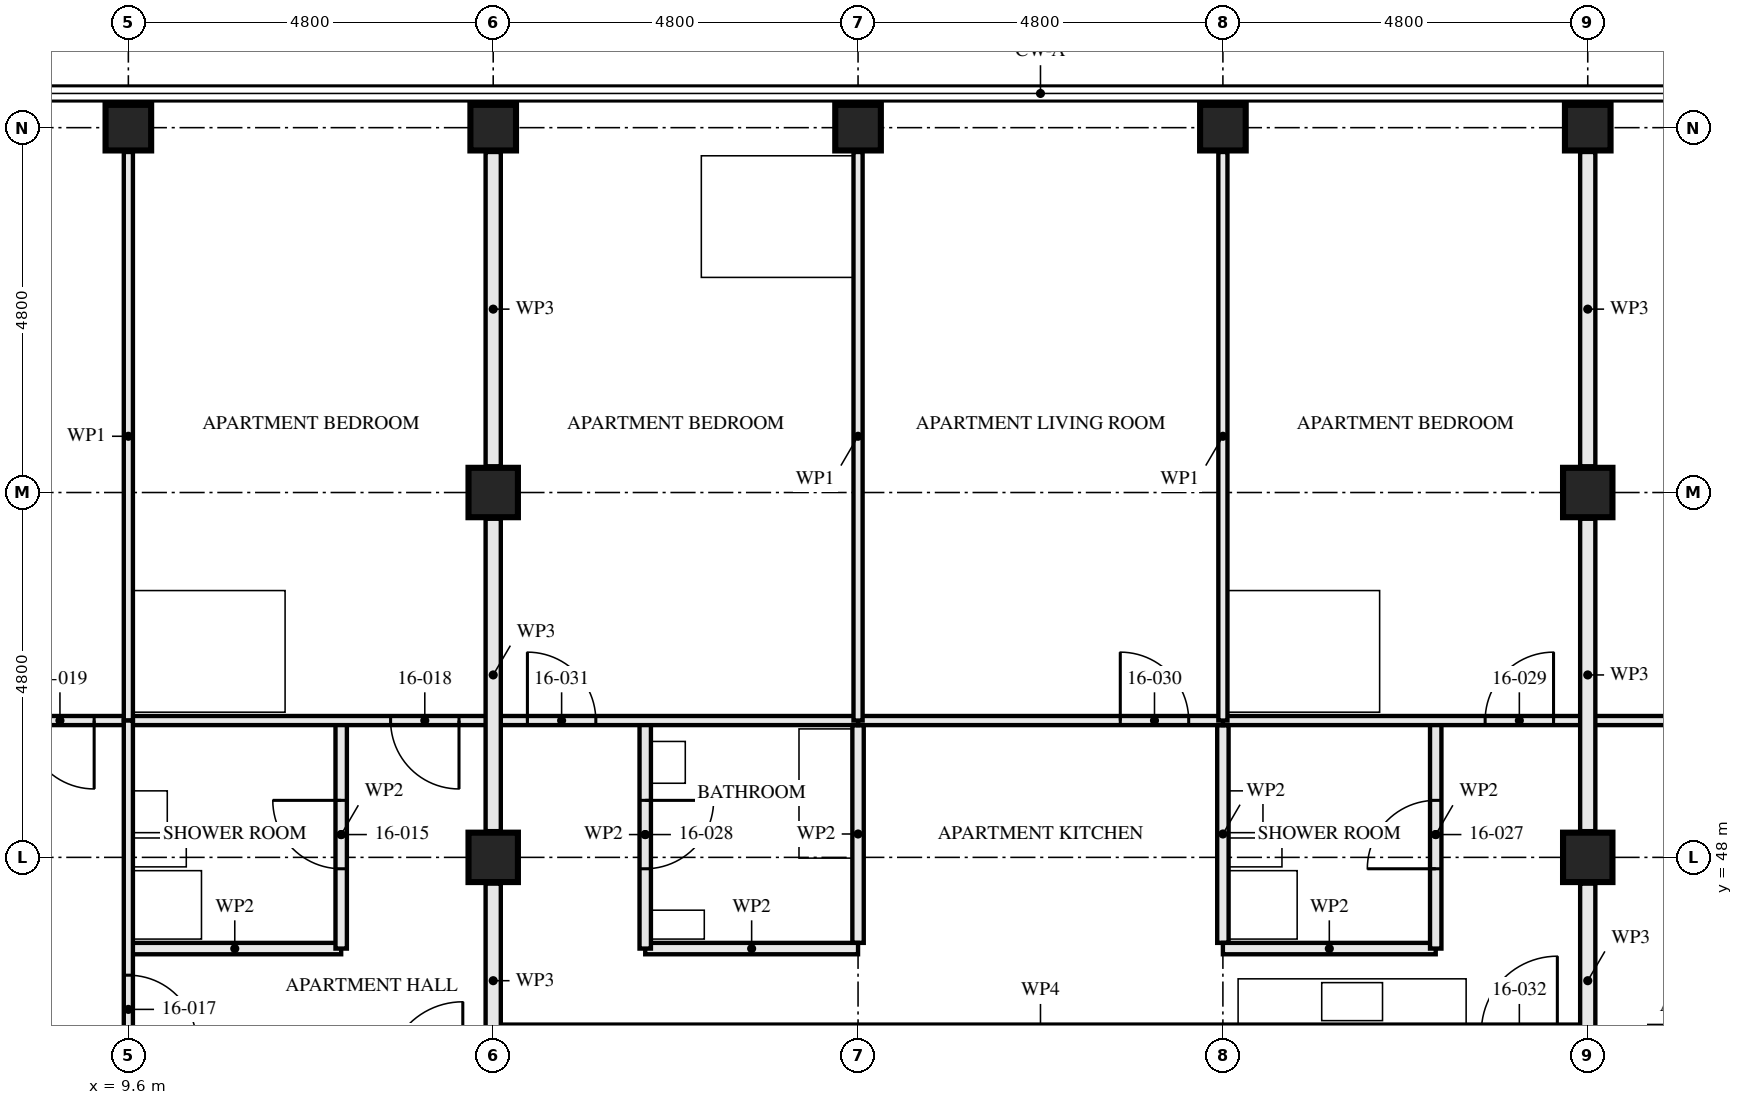
"""IFC4 building model, lengths in metres.
Left out: names, types, materials, properties, quantities, classifications, styles, units other than length and angle.
Written with IfcOpenShell. Run it as: python <this file> out.ifc"""

import sys

from ifc_helpers import new_model, si_unit, direction, frame, frame_2d, origin, origin_2d, place, context, subcontext, project, spatial, rectangle, hollow_rectangle, extrude, element, fill, save


model = new_model("IFC4")
c1 = context("Model", 3, precision=1e-05, world=origin(), true_north=direction((0.0, 1.0)))
c2 = subcontext(c1, "Body", "Model", "MODEL_VIEW")
j1 = project(units=[si_unit("LENGTHUNIT", "METRE"), si_unit("PLANEANGLEUNIT", "RADIAN")], contexts=[c1])
p1 = place(None, origin())
s1 = spatial("IfcSite", under=j1, at=p1, CompositionType="ELEMENT")
p2 = place(p1, origin())
s2 = spatial("IfcBuilding", under=s1, at=p2, CompositionType="ELEMENT")
p3 = place(p2, frame((0.0, 0.0, 62.0)))
s3 = spatial("IfcBuildingStorey", under=s2, at=p3, CompositionType="ELEMENT", Elevation=62.0)
p4 = place(p3, frame((9.6, 57.6, 0.0), z_axis=(0.0, 0.0, 1.0), x_axis=(0.0, 1.0, 0.0)))
e1 = element("IfcColumn", 1, at=p4, inside=s3, PredefinedType="COLUMN", context=c2, shape_type="SweptSolid", body=[
    extrude(hollow_rectangle(XDim=0.6, YDim=0.6, WallThickness=0.08, at=origin_2d()), origin(), (0.0, 0.0, 1.0), 3.5),
])
for number, where, z_axis, x_axis in (
    (2, (14.4, 48.0, 0.0), (0.0, 0.0, 1.0), (1.0, 0.0, 0.0)),
    (3, (14.4, 52.8, 0.0), (0.0, 0.0, 1.0), (1.0, 0.0, 0.0)),
):
    element("IfcColumn", number, at=place(p3, frame(where, z_axis=z_axis, x_axis=x_axis)), inside=s3, PredefinedType="COLUMN", context=c2, shape_type="SweptSolid", body=[
        extrude(hollow_rectangle(XDim=0.65, YDim=0.65, WallThickness=0.05, at=origin_2d()), origin(), (0.0, 0.0, 1.0), 3.5),
    ])
for number, where, z_axis, x_axis in (
    (4, (14.4, 57.6, 0.0), (0.0, 0.0, 1.0), (0.0, 1.0, 0.0)),
    (5, (19.2, 57.6, 0.0), (0.0, 0.0, 1.0), (0.0, 1.0, 0.0)),
    (6, (24.0, 57.6, 0.0), (0.0, 0.0, 1.0), (0.0, 1.0, 0.0)),
):
    element("IfcColumn", number, at=place(p3, frame(where, z_axis=z_axis, x_axis=x_axis)), inside=s3, PredefinedType="COLUMN", context=c2, shape_type="SweptSolid", body=[
        extrude(hollow_rectangle(XDim=0.6, YDim=0.6, WallThickness=0.08, at=origin_2d()), origin(), (0.0, 0.0, 1.0), 3.5),
    ])
for number, where, z_axis, x_axis in (
    (7, (28.8, 48.0, 0.0), (0.0, 0.0, 1.0), (1.0, 0.0, 0.0)),
    (8, (28.8, 52.8, 0.0), (0.0, 0.0, 1.0), (1.0, 0.0, 0.0)),
):
    element("IfcColumn", number, at=place(p3, frame(where, z_axis=z_axis, x_axis=x_axis)), inside=s3, PredefinedType="COLUMN", context=c2, shape_type="SweptSolid", body=[
        extrude(hollow_rectangle(XDim=0.65, YDim=0.65, WallThickness=0.05, at=origin_2d()), origin(), (0.0, 0.0, 1.0), 3.5),
    ])
p5 = place(p3, frame((28.8, 57.6, 0.0), z_axis=(0.0, 0.0, 1.0), x_axis=(0.0, 1.0, 0.0)))
e9 = element("IfcColumn", 9, at=p5, inside=s3, PredefinedType="COLUMN", context=c2, shape_type="SweptSolid", body=[
    extrude(hollow_rectangle(XDim=0.6, YDim=0.6, WallThickness=0.08, at=origin_2d()), origin(), (0.0, 0.0, 1.0), 3.5),
])
p6 = place(p3, frame((12.4, 49.8, 0.0), z_axis=(0.0, 0.0, 1.0), x_axis=(0.0, -1.0, 0.0)))
e10 = element("IfcWall", 10, at=p6, inside=s3, PredefinedType="PARTITIONING", context=c2, shape_type="SweptSolid", body=[
    extrude(rectangle(XDim=3.0, YDim=0.15, at=frame_2d((1.5, 0.0))), origin(), (0.0, 0.0, 1.0), 2.55),
])
p7 = place(p6, frame((1.05, 0.0, 0.0)))
e11 = element("IfcOpeningElement", 11, at=p7, cuts=e10, PredefinedType="OPENING", context=c2, shape_type="SweptSolid", body=[
    extrude(rectangle(XDim=0.9, YDim=2.1, at=frame_2d((0.45, 1.05))), frame((0.0, 0.085, 0.0), z_axis=(0.0, -1.0, 0.0), x_axis=(1.0, 0.0, 0.0)), (0.0, 0.0, 1.0), 0.171),
])
p8 = place(p3, frame((12.4, 46.8, 0.0), z_axis=(0.0, 0.0, 1.0), x_axis=(-1.0, 0.0, 0.0)))
e12 = element("IfcWall", 12, at=p8, inside=s3, PredefinedType="PARTITIONING", context=c2, shape_type="SweptSolid", body=[
    extrude(rectangle(XDim=2.8, YDim=0.15, at=frame_2d((1.4, 0.0))), origin(), (0.0, 0.0, 1.0), 3.33),
])
p9 = place(p3, frame((9.6, 49.8, 0.0), z_axis=(0.0, 0.0, 1.0), x_axis=(0.0, -1.0, 0.0)))
e13 = element("IfcWall", 13, at=p9, inside=s3, PredefinedType="PARTITIONING", context=c2, shape_type="SweptSolid", body=[
    extrude(rectangle(XDim=4.65, YDim=0.12, at=frame_2d((2.325, 0.0))), origin(), (0.0, 0.0, 1.0), 2.55),
])
p10 = place(p9, frame((3.35, 0.0, 0.0)))
e14 = element("IfcOpeningElement", 14, at=p10, cuts=e13, PredefinedType="OPENING", context=c2, shape_type="SweptSolid", body=[
    extrude(rectangle(XDim=0.9, YDim=2.1, at=frame_2d((0.45, 1.05))), frame((0.0, 0.071, 0.0), z_axis=(0.0, -1.0, 0.0), x_axis=(1.0, 0.0, 0.0)), (0.0, 0.0, 1.0), 0.141),
])
p11 = place(p3, frame((14.4, 49.8, 0.0), z_axis=(0.0, 0.0, 1.0), x_axis=(-1.0, 0.0, 0.0)))
e15 = element("IfcWall", 15, at=p11, inside=s3, PredefinedType="PARTITIONING", context=c2, shape_type="SweptSolid", body=[
    extrude(rectangle(XDim=4.8, YDim=0.12, at=frame_2d((2.4, 0.0))), origin(), (0.0, 0.0, 1.0), 3.33),
])
p12 = place(p11, frame((0.45, 0.0, 0.0)))
e16 = element("IfcOpeningElement", 16, at=p12, cuts=e15, PredefinedType="OPENING", context=c2, shape_type="SweptSolid", body=[
    extrude(rectangle(XDim=0.9, YDim=2.1, at=frame_2d((0.45, 1.05))), frame((0.0, 0.071, 0.0), z_axis=(0.0, -1.0, 0.0), x_axis=(1.0, 0.0, 0.0)), (0.0, 0.0, 1.0), 0.141),
])
p13 = place(p3, frame((9.6, 49.8, 0.0), z_axis=(0.0, 0.0, 1.0), x_axis=(-1.0, 0.0, 0.0)))
e17 = element("IfcWall", 17, at=p13, inside=s3, PredefinedType="PARTITIONING", context=c2, shape_type="SweptSolid", body=[
    extrude(rectangle(XDim=4.8, YDim=0.12, at=frame_2d((2.4, 0.0))), origin(), (0.0, 0.0, 1.0), 3.33),
])
p14 = place(p13, frame((0.45, 0.0, 0.0)))
e18 = element("IfcOpeningElement", 18, at=p14, cuts=e17, PredefinedType="OPENING", context=c2, shape_type="SweptSolid", body=[
    extrude(rectangle(XDim=0.9, YDim=2.1, at=frame_2d((0.45, 1.05))), frame((0.0, 0.071, 0.0), z_axis=(0.0, -1.0, 0.0), x_axis=(1.0, 0.0, 0.0)), (0.0, 0.0, 1.0), 0.141),
])
p15 = place(p3, frame((9.6, 57.28, 0.0), z_axis=(0.0, 0.0, 1.0), x_axis=(0.0, -1.0, 0.0)))
e19 = element("IfcWall", 19, at=p15, inside=s3, PredefinedType="PARTITIONING", context=c2, shape_type="SweptSolid", body=[
    extrude(rectangle(XDim=7.48, YDim=0.12, at=frame_2d((3.74, 0.0))), origin(), (0.0, 0.0, 1.0), 2.55),
])
p16 = place(p3, frame((26.8, 49.8, 0.0), z_axis=(0.0, 0.0, 1.0), x_axis=(0.0, -1.0, 0.0)))
e20 = element("IfcWall", 20, at=p16, inside=s3, PredefinedType="PARTITIONING", context=c2, shape_type="SweptSolid", body=[
    extrude(rectangle(XDim=3.0, YDim=0.15, at=frame_2d((1.5, 0.0))), origin(), (0.0, 0.0, 1.0), 2.55),
])
p17 = place(p16, frame((1.05, 0.0, 0.0)))
e21 = element("IfcOpeningElement", 21, at=p17, cuts=e20, PredefinedType="OPENING", context=c2, shape_type="SweptSolid", body=[
    extrude(rectangle(XDim=0.9, YDim=2.1, at=frame_2d((0.45, 1.05))), frame((0.0, 0.085, 0.0), z_axis=(0.0, -1.0, 0.0), x_axis=(1.0, 0.0, 0.0)), (0.0, 0.0, 1.0), 0.171),
])
p18 = place(p3, frame((26.8, 46.8, 0.0), z_axis=(0.0, 0.0, 1.0), x_axis=(-1.0, 0.0, 0.0)))
e22 = element("IfcWall", 22, at=p18, inside=s3, PredefinedType="PARTITIONING", context=c2, shape_type="SweptSolid", body=[
    extrude(rectangle(XDim=2.8, YDim=0.15, at=frame_2d((1.4, 0.0))), origin(), (0.0, 0.0, 1.0), 3.33),
])
p19 = place(p3, frame((16.4, 49.8, 0.0), z_axis=(0.0, 0.0, 1.0), x_axis=(0.0, -1.0, 0.0)))
e23 = element("IfcWall", 23, at=p19, inside=s3, PredefinedType="PARTITIONING", context=c2, shape_type="SweptSolid", body=[
    extrude(rectangle(XDim=3.0, YDim=0.15, at=frame_2d((1.5, 0.0))), origin(), (0.0, 0.0, 1.0), 2.55),
])
p20 = place(p19, frame((1.05, 0.0, 0.0)))
e24 = element("IfcOpeningElement", 24, at=p20, cuts=e23, PredefinedType="OPENING", context=c2, shape_type="SweptSolid", body=[
    extrude(rectangle(XDim=0.9, YDim=2.1, at=frame_2d((0.45, 1.05))), frame((0.0, 0.085, 0.0), z_axis=(0.0, -1.0, 0.0), x_axis=(1.0, 0.0, 0.0)), (0.0, 0.0, 1.0), 0.171),
])
p21 = place(p3, frame((19.2, 46.8, 0.0), z_axis=(0.0, 0.0, 1.0), x_axis=(-1.0, 0.0, 0.0)))
e25 = element("IfcWall", 25, at=p21, inside=s3, PredefinedType="PARTITIONING", context=c2, shape_type="SweptSolid", body=[
    extrude(rectangle(XDim=2.8, YDim=0.15, at=frame_2d((1.4, 0.0))), origin(), (0.0, 0.0, 1.0), 3.33),
])
p22 = place(p3, frame((28.8, 49.8, 0.0), z_axis=(0.0, 0.0, 1.0), x_axis=(-1.0, 0.0, 0.0)))
e26 = element("IfcWall", 26, at=p22, inside=s3, PredefinedType="PARTITIONING", context=c2, shape_type="SweptSolid", body=[
    extrude(rectangle(XDim=4.8, YDim=0.12, at=frame_2d((2.4, 0.0))), origin(), (0.0, 0.0, 1.0), 3.33),
])
p23 = place(p22, frame((0.45, 0.0, 0.0)))
e27 = element("IfcOpeningElement", 27, at=p23, cuts=e26, PredefinedType="OPENING", context=c2, shape_type="SweptSolid", body=[
    extrude(rectangle(XDim=0.9, YDim=2.1, at=frame_2d((0.45, 1.05))), frame((0.0, 0.071, 0.0), z_axis=(0.0, -1.0, 0.0), x_axis=(1.0, 0.0, 0.0)), (0.0, 0.0, 1.0), 0.141),
])
p24 = place(p3, frame((24.0, 49.8, 0.0), z_axis=(0.0, 0.0, 1.0), x_axis=(-1.0, 0.0, 0.0)))
e28 = element("IfcWall", 28, at=p24, inside=s3, PredefinedType="PARTITIONING", context=c2, shape_type="SweptSolid", body=[
    extrude(rectangle(XDim=4.8, YDim=0.12, at=frame_2d((2.4, 0.0))), origin(), (0.0, 0.0, 1.0), 3.33),
])
p25 = place(p24, frame((0.45, 0.0, 0.0)))
e29 = element("IfcOpeningElement", 29, at=p25, cuts=e28, PredefinedType="OPENING", context=c2, shape_type="SweptSolid", body=[
    extrude(rectangle(XDim=0.9, YDim=2.1, at=frame_2d((0.45, 1.05))), frame((0.0, 0.071, 0.0), z_axis=(0.0, -1.0, 0.0), x_axis=(1.0, 0.0, 0.0)), (0.0, 0.0, 1.0), 0.141),
])
p26 = place(p3, frame((19.2, 49.8, 0.0), z_axis=(0.0, 0.0, 1.0), x_axis=(-1.0, 0.0, 0.0)))
e30 = element("IfcWall", 30, at=p26, inside=s3, PredefinedType="PARTITIONING", context=c2, shape_type="SweptSolid", body=[
    extrude(rectangle(XDim=4.8, YDim=0.12, at=frame_2d((2.4, 0.0))), origin(), (0.0, 0.0, 1.0), 3.33),
])
p27 = place(p26, frame((3.45, 0.0, 0.0)))
e31 = element("IfcOpeningElement", 31, at=p27, cuts=e30, PredefinedType="OPENING", context=c2, shape_type="SweptSolid", body=[
    extrude(rectangle(XDim=0.9, YDim=2.1, at=frame_2d((0.45, 1.05))), frame((0.0, 0.071, 0.0), z_axis=(0.0, -1.0, 0.0), x_axis=(1.0, 0.0, 0.0)), (0.0, 0.0, 1.0), 0.141),
])
for number, where, z_axis, x_axis in (
    (32, (24.0, 57.28, 0.0), (0.0, 0.0, 1.0), (0.0, -1.0, 0.0)),
    (33, (19.2, 57.28, 0.0), (0.0, 0.0, 1.0), (0.0, -1.0, 0.0)),
):
    element("IfcWall", number, at=place(p3, frame(where, z_axis=z_axis, x_axis=x_axis)), inside=s3, PredefinedType="PARTITIONING", context=c2, shape_type="SweptSolid", body=[
        extrude(rectangle(XDim=7.48, YDim=0.12, at=frame_2d((3.74, 0.0))), origin(), (0.0, 0.0, 1.0), 2.55),
    ])
p28 = place(p3, frame((33.6, 49.8, 0.0), z_axis=(0.0, 0.0, 1.0), x_axis=(-1.0, 0.0, 0.0)))
e34 = element("IfcWall", 34, at=p28, inside=s3, PredefinedType="PARTITIONING", context=c2, shape_type="SweptSolid", body=[
    extrude(rectangle(XDim=4.8, YDim=0.12, at=frame_2d((2.4, 0.0))), origin(), (0.0, 0.0, 1.0), 3.33),
])
p29 = place(p3, frame((14.4, 45.1, 0.0), z_axis=(0.0, 0.0, 1.0), x_axis=(0.0, 1.0, 0.0)))
e35 = element("IfcWall", 35, at=p29, inside=s3, PredefinedType="PARTITIONING", context=c2, shape_type="SweptSolid", body=[
    extrude(rectangle(XDim=2.555, YDim=0.2, at=frame_2d((1.277, 0.0))), origin(), (0.0, 0.0, 1.0), 2.32),
])
p30 = place(p3, frame((14.4, 48.345, 0.0), z_axis=(0.0, 0.0, 1.0), x_axis=(0.0, 1.0, 0.0)))
e36 = element("IfcWall", 36, at=p30, inside=s3, PredefinedType="PARTITIONING", context=c2, shape_type="SweptSolid", body=[
    extrude(rectangle(XDim=4.11, YDim=0.2, at=frame_2d((2.055, 0.0))), origin(), (0.0, 0.0, 1.0), 2.32),
])
p31 = place(p3, frame((14.4, 53.145, 0.0), z_axis=(0.0, 0.0, 1.0), x_axis=(0.0, 1.0, 0.0)))
e37 = element("IfcWall", 37, at=p31, inside=s3, PredefinedType="PARTITIONING", context=c2, shape_type="SweptSolid", body=[
    extrude(rectangle(XDim=4.135, YDim=0.2, at=frame_2d((2.067, 0.0))), origin(), (0.0, 0.0, 1.0), 2.32),
])
p32 = place(p3, frame((28.8, 45.1, 0.0), z_axis=(0.0, 0.0, 1.0), x_axis=(0.0, 1.0, 0.0)))
e38 = element("IfcWall", 38, at=p32, inside=s3, PredefinedType="PARTITIONING", context=c2, shape_type="SweptSolid", body=[
    extrude(rectangle(XDim=2.555, YDim=0.2, at=frame_2d((1.277, 0.0))), origin(), (0.0, 0.0, 1.0), 2.32),
])
p33 = place(p3, frame((28.8, 48.345, 0.0), z_axis=(0.0, 0.0, 1.0), x_axis=(0.0, 1.0, 0.0)))
e39 = element("IfcWall", 39, at=p33, inside=s3, PredefinedType="PARTITIONING", context=c2, shape_type="SweptSolid", body=[
    extrude(rectangle(XDim=4.11, YDim=0.2, at=frame_2d((2.055, 0.0))), origin(), (0.0, 0.0, 1.0), 2.32),
])
p34 = place(p3, frame((28.8, 53.145, 0.0), z_axis=(0.0, 0.0, 1.0), x_axis=(0.0, 1.0, 0.0)))
e40 = element("IfcWall", 40, at=p34, inside=s3, PredefinedType="PARTITIONING", context=c2, shape_type="SweptSolid", body=[
    extrude(rectangle(XDim=4.135, YDim=0.2, at=frame_2d((2.067, 0.0))), origin(), (0.0, 0.0, 1.0), 2.32),
])
for number, where, z_axis, x_axis in (
    (41, (24.0, 46.875, 0.0), (0.0, 0.0, 1.0), (0.0, 1.0, 0.0)),
    (42, (19.2, 49.74, 0.0), (0.0, 0.0, 1.0), (0.0, -1.0, 0.0)),
):
    element("IfcWall", number, at=place(p3, frame(where, z_axis=z_axis, x_axis=x_axis)), inside=s3, PredefinedType="PARTITIONING", context=c2, shape_type="SweptSolid", body=[
        extrude(rectangle(XDim=2.865, YDim=0.15, at=frame_2d((1.433, 0.0))), origin(), (0.0, 0.0, 1.0), 2.55),
    ])
p35 = place(p7, frame((0.9, 0.0, 0.0), z_axis=(0.0, 0.0, 1.0), x_axis=(-1.0, 0.0, 0.0)))
e43 = element("IfcDoor", 43, at=p35, inside=s3, OperationType="SINGLE_SWING_LEFT", PredefinedType="DOOR", context=c2, shape_type="SweptSolid", body=[
    extrude(rectangle(XDim=0.9, YDim=2.1, at=frame_2d((0.45, 1.05))), frame((0.0, 0.022, 0.0), z_axis=(0.0, -1.0, 0.0), x_axis=(1.0, 0.0, 0.0)), (0.0, 0.0, 1.0), 0.044),
])
fill(e11, e43)
p36 = place(p10, origin())
e44 = element("IfcDoor", 44, at=p36, inside=s3, OperationType="SINGLE_SWING_LEFT", PredefinedType="DOOR", context=c2, shape_type="SweptSolid", body=[
    extrude(rectangle(XDim=0.9, YDim=2.1, at=frame_2d((0.45, 1.05))), frame((0.0, 0.022, 0.0), z_axis=(0.0, -1.0, 0.0), x_axis=(1.0, 0.0, 0.0)), (0.0, 0.0, 1.0), 0.044),
])
fill(e14, e44)
p37 = place(p12, origin())
e45 = element("IfcDoor", 45, at=p37, inside=s3, OperationType="SINGLE_SWING_RIGHT", PredefinedType="DOOR", context=c2, shape_type="SweptSolid", body=[
    extrude(rectangle(XDim=0.9, YDim=2.1, at=frame_2d((0.45, 1.05))), frame((0.0, 0.022, 0.0), z_axis=(0.0, -1.0, 0.0), x_axis=(1.0, 0.0, 0.0)), (0.0, 0.0, 1.0), 0.044),
])
fill(e16, e45)
p38 = place(p14, origin())
e46 = element("IfcDoor", 46, at=p38, inside=s3, OperationType="SINGLE_SWING_RIGHT", PredefinedType="DOOR", context=c2, shape_type="SweptSolid", body=[
    extrude(rectangle(XDim=0.9, YDim=2.1, at=frame_2d((0.45, 1.05))), frame((0.0, 0.022, 0.0), z_axis=(0.0, -1.0, 0.0), x_axis=(1.0, 0.0, 0.0)), (0.0, 0.0, 1.0), 0.044),
])
fill(e18, e46)
p39 = place(p17, frame((0.9, 0.0, 0.0), z_axis=(0.0, 0.0, 1.0), x_axis=(-1.0, 0.0, 0.0)))
e47 = element("IfcDoor", 47, at=p39, inside=s3, OperationType="SINGLE_SWING_RIGHT", PredefinedType="DOOR", context=c2, shape_type="SweptSolid", body=[
    extrude(rectangle(XDim=0.9, YDim=2.1, at=frame_2d((0.45, 1.05))), frame((0.0, 0.022, 0.0), z_axis=(0.0, -1.0, 0.0), x_axis=(1.0, 0.0, 0.0)), (0.0, 0.0, 1.0), 0.044),
])
fill(e21, e47)
p40 = place(p20, origin())
e48 = element("IfcDoor", 48, at=p40, inside=s3, OperationType="SINGLE_SWING_RIGHT", PredefinedType="DOOR", context=c2, shape_type="SweptSolid", body=[
    extrude(rectangle(XDim=0.9, YDim=2.1, at=frame_2d((0.45, 1.05))), frame((0.0, 0.022, 0.0), z_axis=(0.0, -1.0, 0.0), x_axis=(1.0, 0.0, 0.0)), (0.0, 0.0, 1.0), 0.044),
])
fill(e24, e48)
p41 = place(p23, frame((0.9, 0.0, 0.0), z_axis=(0.0, 0.0, 1.0), x_axis=(-1.0, 0.0, 0.0)))
e49 = element("IfcDoor", 49, at=p41, inside=s3, OperationType="SINGLE_SWING_LEFT", PredefinedType="DOOR", context=c2, shape_type="SweptSolid", body=[
    extrude(rectangle(XDim=0.9, YDim=2.1, at=frame_2d((0.45, 1.05))), frame((0.0, 0.022, 0.0), z_axis=(0.0, -1.0, 0.0), x_axis=(1.0, 0.0, 0.0)), (0.0, 0.0, 1.0), 0.044),
])
fill(e27, e49)
p42 = place(p25, frame((0.9, 0.0, 0.0), z_axis=(0.0, 0.0, 1.0), x_axis=(-1.0, 0.0, 0.0)))
e50 = element("IfcDoor", 50, at=p42, inside=s3, OperationType="SINGLE_SWING_RIGHT", PredefinedType="DOOR", context=c2, shape_type="SweptSolid", body=[
    extrude(rectangle(XDim=0.9, YDim=2.1, at=frame_2d((0.45, 1.05))), frame((0.0, 0.022, 0.0), z_axis=(0.0, -1.0, 0.0), x_axis=(1.0, 0.0, 0.0)), (0.0, 0.0, 1.0), 0.044),
])
fill(e29, e50)
p43 = place(p27, frame((0.9, 0.0, 0.0), z_axis=(0.0, 0.0, 1.0), x_axis=(-1.0, 0.0, 0.0)))
e51 = element("IfcDoor", 51, at=p43, inside=s3, OperationType="SINGLE_SWING_RIGHT", PredefinedType="DOOR", context=c2, shape_type="SweptSolid", body=[
    extrude(rectangle(XDim=0.9, YDim=2.1, at=frame_2d((0.45, 1.05))), frame((0.0, 0.022, 0.0), z_axis=(0.0, -1.0, 0.0), x_axis=(1.0, 0.0, 0.0)), (0.0, 0.0, 1.0), 0.044),
])
fill(e31, e51)
save(model, sys.argv[1])
